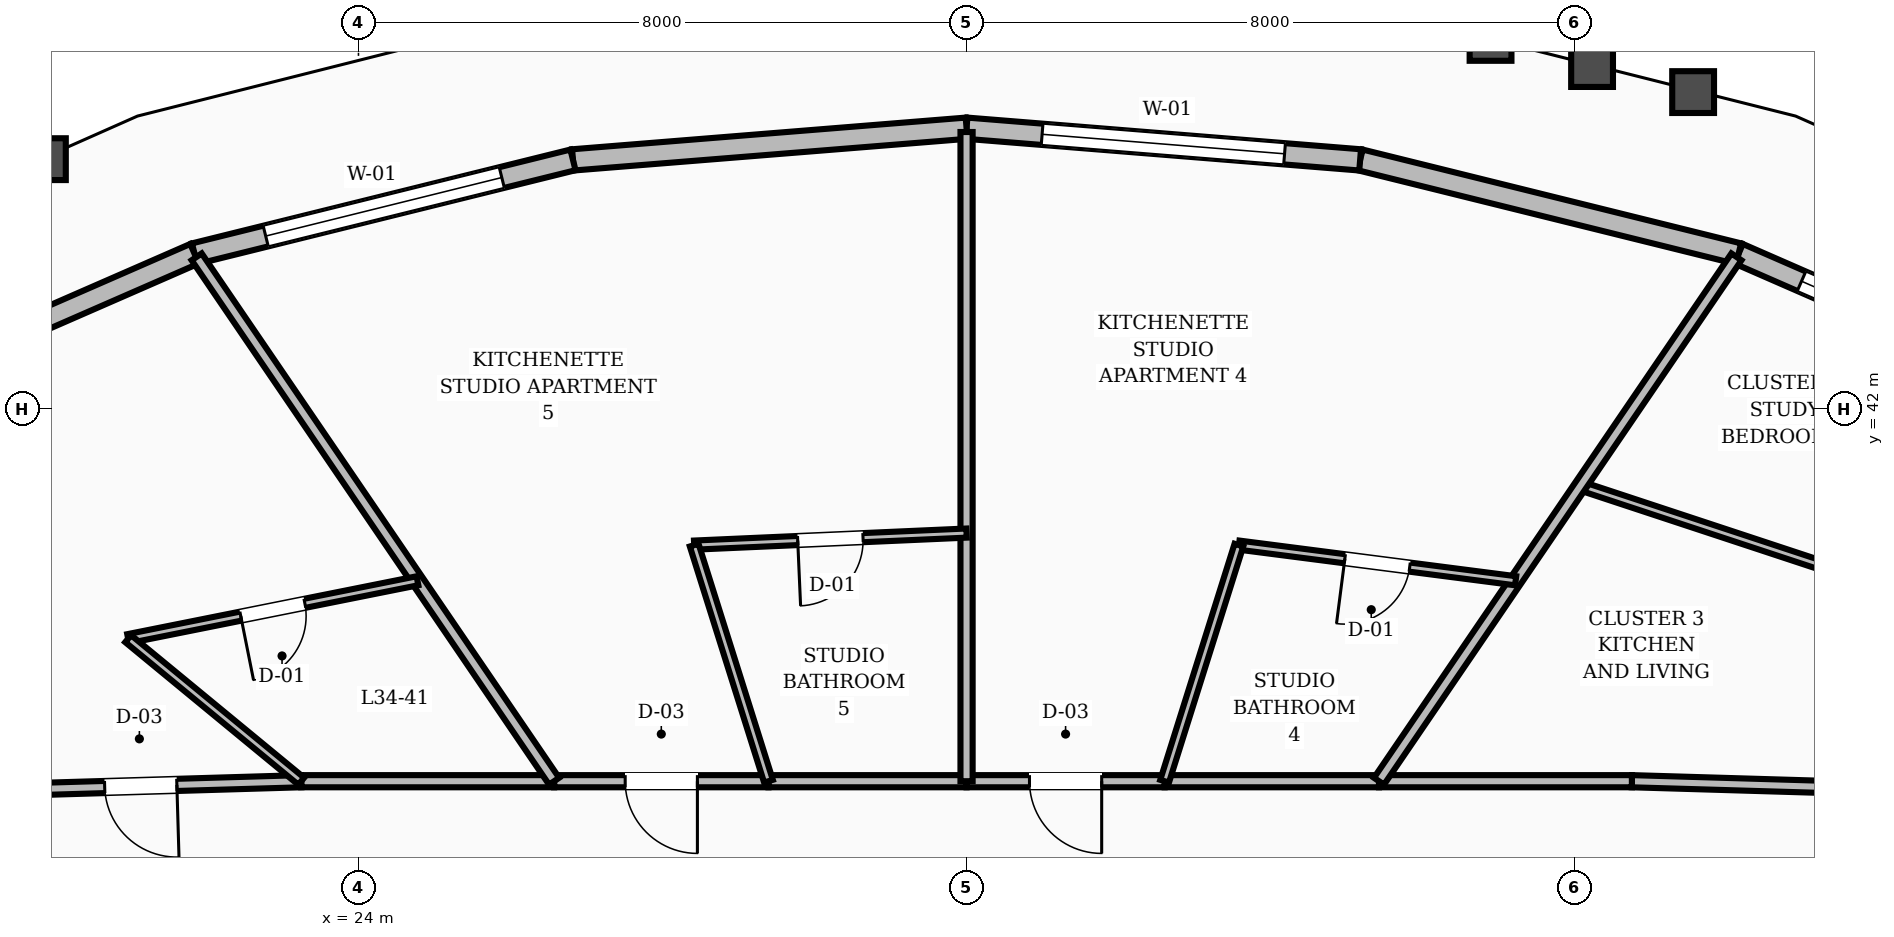
"""IFC4 building model, lengths in metres.
Left out: names, types, materials, properties, quantities, classifications, styles, units other than length and angle.
Written with IfcOpenShell. Run it as: python <this file> out.ifc"""

import sys

from ifc_helpers import new_model, si_unit, direction, frame, frame_2d, origin, place, context, subcontext, project, spatial, rectangle, extrude, element, fill, save


model = new_model("IFC4")
c1 = context("Model", 3, precision=1e-05, world=origin(), true_north=direction((0.0, 1.0)))
c2 = subcontext(c1, "Body", "Model", "MODEL_VIEW")
j1 = project(units=[si_unit("LENGTHUNIT", "METRE"), si_unit("PLANEANGLEUNIT", "RADIAN")], contexts=[c1])
p1 = place(None, origin())
s1 = spatial("IfcSite", under=j1, at=p1, CompositionType="ELEMENT")
p2 = place(p1, origin())
s2 = spatial("IfcBuilding", under=s1, at=p2, CompositionType="ELEMENT")
p3 = place(p2, frame((0.0, 0.0, 135.2)))
s3 = spatial("IfcBuildingStorey", under=s2, at=p3, CompositionType="ELEMENT", Elevation=135.2)
p4 = place(p3, frame((46.746, 42.035, 0.0), z_axis=(0.0, 0.0, 1.0), x_axis=(-0.916386582237, 0.400294431507, 0.0)))
e1 = element("IfcWall", 1, at=p4, inside=s3, PredefinedType="STANDARD", context=c2, shape_type="SweptSolid", body=[
    extrude(rectangle(XDim=5.007, YDim=0.28, at=frame_2d((2.504, 0.0))), origin(), (0.0, 0.0, 1.0), 2.82),
])
p5 = place(p4, frame((0.904, 0.0, 0.8)))
e2 = element("IfcOpeningElement", 2, at=p5, cuts=e1, PredefinedType="OPENING", context=c2, shape_type="SweptSolid", body=[
    extrude(rectangle(XDim=3.2, YDim=1.65, at=frame_2d((1.6, 0.825))), frame((0.0, 0.15, 0.0), z_axis=(0.0, -1.0, 0.0), x_axis=(1.0, 0.0, 0.0)), (0.0, 0.0, 1.0), 0.3),
])
p6 = place(p3, frame((42.157, 44.04, 0.0), z_axis=(0.0, 0.0, 1.0), x_axis=(-0.970616564694, 0.240631428415, 0.0)))
e3 = element("IfcWall", 3, at=p6, inside=s3, PredefinedType="STANDARD", context=c2, shape_type="SweptSolid", body=[
    extrude(rectangle(XDim=5.13, YDim=0.28, at=frame_2d((2.565, 0.0))), origin(), (0.0, 0.0, 1.0), 2.82),
])
p7 = place(p3, frame((37.178, 45.274, 0.0), z_axis=(0.0, 0.0, 1.0), x_axis=(-0.996776757723, 0.080225278204, 0.0)))
e4 = element("IfcWall", 4, at=p7, inside=s3, PredefinedType="STANDARD", context=c2, shape_type="SweptSolid", body=[
    extrude(rectangle(XDim=5.195, YDim=0.28, at=frame_2d((2.597, 0.0))), origin(), (0.0, 0.0, 1.0), 2.82),
])
p8 = place(p7, frame((0.997, 0.0, 0.8)))
e5 = element("IfcOpeningElement", 5, at=p8, cuts=e4, PredefinedType="OPENING", context=c2, shape_type="SweptSolid", body=[
    extrude(rectangle(XDim=3.2, YDim=1.65, at=frame_2d((1.6, 0.825))), frame((0.0, 0.15, 0.0), z_axis=(0.0, -1.0, 0.0), x_axis=(1.0, 0.0, 0.0)), (0.0, 0.0, 1.0), 0.3),
])
p9 = place(p3, frame((32.0, 45.691, 0.0), z_axis=(0.0, 0.0, 1.0), x_axis=(-0.996776757723, -0.080225278204, 0.0)))
e6 = element("IfcWall", 6, at=p9, inside=s3, PredefinedType="STANDARD", context=c2, shape_type="SweptSolid", body=[
    extrude(rectangle(XDim=5.195, YDim=0.28, at=frame_2d((2.597, 0.0))), origin(), (0.0, 0.0, 1.0), 2.82),
])
p10 = place(p3, frame((26.822, 45.274, 0.0), z_axis=(0.0, 0.0, 1.0), x_axis=(-0.970616564694, -0.240631428415, 0.0)))
e7 = element("IfcWall", 7, at=p10, inside=s3, PredefinedType="STANDARD", context=c2, shape_type="SweptSolid", body=[
    extrude(rectangle(XDim=5.13, YDim=0.28, at=frame_2d((2.565, 0.0))), origin(), (0.0, 0.0, 1.0), 2.82),
])
p11 = place(p10, frame((0.965, 0.0, 0.8)))
e8 = element("IfcOpeningElement", 8, at=p11, cuts=e7, PredefinedType="OPENING", context=c2, shape_type="SweptSolid", body=[
    extrude(rectangle(XDim=3.2, YDim=1.65, at=frame_2d((1.6, 0.825))), frame((0.0, 0.15, 0.0), z_axis=(0.0, -1.0, 0.0), x_axis=(1.0, 0.0, 0.0)), (0.0, 0.0, 1.0), 0.3),
])
p12 = place(p3, frame((21.843, 44.04, 0.0), z_axis=(0.0, 0.0, 1.0), x_axis=(-0.916386582237, -0.400294431507, 0.0)))
e9 = element("IfcWall", 9, at=p12, inside=s3, PredefinedType="STANDARD", context=c2, shape_type="SweptSolid", body=[
    extrude(rectangle(XDim=5.007, YDim=0.28, at=frame_2d((2.504, 0.0))), origin(), (0.0, 0.0, 1.0), 2.82),
])
p13 = place(p3, frame((44.975, 36.975, 0.0), z_axis=(0.0, 0.0, 1.0), x_axis=(-0.999561990195, 0.029594387265, 0.0)))
e10 = element("IfcWall", 10, at=p13, inside=s3, PredefinedType="SOLIDWALL", context=c2, shape_type="SweptSolid", body=[
    extrude(rectangle(XDim=4.224, YDim=0.16, at=frame_2d((2.112, 0.0))), origin(), (0.0, 0.0, 1.0), 2.8),
])
p14 = place(p3, frame((40.753, 37.1, 0.0), z_axis=(0.0, 0.0, 1.0), x_axis=(-1.0, 0.0, 0.0)))
e11 = element("IfcWall", 11, at=p14, inside=s3, PredefinedType="SOLIDWALL", context=c2, shape_type="SweptSolid", body=[
    extrude(rectangle(XDim=3.327, YDim=0.16, at=frame_2d((1.664, 0.0))), origin(), (0.0, 0.0, 1.0), 2.8),
])
p15 = place(p3, frame((37.426, 37.1, 0.0), z_axis=(0.0, 0.0, 1.0), x_axis=(-1.0, 0.0, 0.0)))
e12 = element("IfcWall", 12, at=p15, inside=s3, PredefinedType="SOLIDWALL", context=c2, shape_type="SweptSolid", body=[
    extrude(rectangle(XDim=2.821, YDim=0.16, at=frame_2d((1.41, 0.0))), origin(), (0.0, 0.0, 1.0), 2.8),
])
p16 = place(p3, frame((34.606, 37.1, 0.0), z_axis=(0.0, 0.0, 1.0), x_axis=(-1.0, 0.0, 0.0)))
e13 = element("IfcWall", 13, at=p16, inside=s3, PredefinedType="SOLIDWALL", context=c2, shape_type="SweptSolid", body=[
    extrude(rectangle(XDim=2.606, YDim=0.16, at=frame_2d((1.303, 0.0))), origin(), (0.0, 0.0, 1.0), 2.8),
])
p17 = place(p16, frame((0.828, 0.0, 0.0)))
e14 = element("IfcOpeningElement", 14, at=p17, cuts=e13, PredefinedType="OPENING", context=c2, shape_type="SweptSolid", body=[
    extrude(rectangle(XDim=0.95, YDim=2.1, at=frame_2d((0.475, 1.05))), frame((0.0, 0.09, 0.0), z_axis=(0.0, -1.0, 0.0), x_axis=(1.0, 0.0, 0.0)), (0.0, 0.0, 1.0), 0.18),
])
p18 = place(p3, frame((32.0, 37.1, 0.0), z_axis=(0.0, 0.0, 1.0), x_axis=(-1.0, 0.0, 0.0)))
e15 = element("IfcWall", 15, at=p18, inside=s3, PredefinedType="SOLIDWALL", context=c2, shape_type="SweptSolid", body=[
    extrude(rectangle(XDim=2.606, YDim=0.16, at=frame_2d((1.303, 0.0))), origin(), (0.0, 0.0, 1.0), 2.8),
])
p19 = place(p3, frame((29.394, 37.1, 0.0), z_axis=(0.0, 0.0, 1.0), x_axis=(-1.0, 0.0, 0.0)))
e16 = element("IfcWall", 16, at=p19, inside=s3, PredefinedType="SOLIDWALL", context=c2, shape_type="SweptSolid", body=[
    extrude(rectangle(XDim=2.821, YDim=0.16, at=frame_2d((1.41, 0.0))), origin(), (0.0, 0.0, 1.0), 2.8),
])
p20 = place(p19, frame((0.935, 0.0, 0.0)))
e17 = element("IfcOpeningElement", 17, at=p20, cuts=e16, PredefinedType="OPENING", context=c2, shape_type="SweptSolid", body=[
    extrude(rectangle(XDim=0.95, YDim=2.1, at=frame_2d((0.475, 1.05))), frame((0.0, 0.09, 0.0), z_axis=(0.0, -1.0, 0.0), x_axis=(1.0, 0.0, 0.0)), (0.0, 0.0, 1.0), 0.18),
])
p21 = place(p3, frame((26.574, 37.1, 0.0), z_axis=(0.0, 0.0, 1.0), x_axis=(-1.0, 0.0, 0.0)))
e18 = element("IfcWall", 18, at=p21, inside=s3, PredefinedType="SOLIDWALL", context=c2, shape_type="SweptSolid", body=[
    extrude(rectangle(XDim=3.327, YDim=0.16, at=frame_2d((1.664, 0.0))), origin(), (0.0, 0.0, 1.0), 2.8),
])
p22 = place(p3, frame((23.247, 37.1, 0.0), z_axis=(0.0, 0.0, 1.0), x_axis=(-0.999561990195, -0.029594387265, 0.0)))
e19 = element("IfcWall", 19, at=p22, inside=s3, PredefinedType="SOLIDWALL", context=c2, shape_type="SweptSolid", body=[
    extrude(rectangle(XDim=4.224, YDim=0.16, at=frame_2d((2.112, 0.0))), origin(), (0.0, 0.0, 1.0), 2.8),
])
p23 = place(p22, frame((1.637, 0.0, 0.0)))
e20 = element("IfcOpeningElement", 20, at=p23, cuts=e19, PredefinedType="OPENING", context=c2, shape_type="SweptSolid", body=[
    extrude(rectangle(XDim=0.95, YDim=2.1, at=frame_2d((0.475, 1.05))), frame((0.0, 0.09, 0.0), z_axis=(0.0, -1.0, 0.0), x_axis=(1.0, 0.0, 0.0)), (0.0, 0.0, 1.0), 0.18),
])
p24 = place(p3, frame((48.219, 38.298, 0.0), z_axis=(0.0, 0.0, 1.0), x_axis=(-0.949596025741, 0.313476295591, 0.0)))
e21 = element("IfcWall", 21, at=p24, inside=s3, PredefinedType="PARTITIONING", context=c2, shape_type="SweptSolid", body=[
    extrude(rectangle(XDim=8.575, YDim=0.12, at=frame_2d((4.288, 0.0))), origin(), (0.0, 0.0, 1.0), 2.8),
])
p25 = place(p24, frame((3.813, 0.0, 0.0)))
e22 = element("IfcOpeningElement", 22, at=p25, cuts=e21, PredefinedType="OPENING", context=c2, shape_type="SweptSolid", body=[
    extrude(rectangle(XDim=0.95, YDim=2.1, at=frame_2d((0.475, 1.05))), frame((0.0, 0.07, 0.0), z_axis=(0.0, -1.0, 0.0), x_axis=(1.0, 0.0, 0.0)), (0.0, 0.0, 1.0), 0.14),
])
p26 = place(p3, frame((37.426, 37.1, 0.0), z_axis=(0.0, 0.0, 1.0), x_axis=(0.563247896503, 0.826287968619, 0.0)))
e23 = element("IfcWall", 23, at=p26, inside=s3, PredefinedType="SOLIDWALL", context=c2, shape_type="SweptSolid", body=[
    extrude(rectangle(XDim=8.349, YDim=0.16, at=frame_2d((4.174, 0.0))), origin(), (0.0, 0.0, 1.0), 2.8),
])
p27 = place(p3, frame((39.224, 39.737, 0.0), z_axis=(0.0, 0.0, 1.0), x_axis=(-0.991795828826, 0.127832053581, 0.0)))
e24 = element("IfcWall", 24, at=p27, inside=s3, PredefinedType="PARTITIONING", context=c2, shape_type="SweptSolid", body=[
    extrude(rectangle(XDim=3.671, YDim=0.12, at=frame_2d((1.835, 0.0))), origin(), (0.0, 0.0, 1.0), 2.8),
])
p28 = place(p27, frame((1.406, 0.0, 0.0)))
e25 = element("IfcOpeningElement", 25, at=p28, cuts=e24, PredefinedType="OPENING", context=c2, shape_type="SweptSolid", body=[
    extrude(rectangle(XDim=0.86, YDim=2.1, at=frame_2d((0.43, 1.05))), frame((0.0, 0.07, 0.0), z_axis=(0.0, -1.0, 0.0), x_axis=(1.0, 0.0, 0.0)), (0.0, 0.0, 1.0), 0.14),
])
p29 = place(p3, frame((34.606, 37.1, 0.0), z_axis=(0.0, 0.0, 1.0), x_axis=(0.300191134318, 0.953879071411, 0.0)))
e26 = element("IfcWall", 26, at=p29, inside=s3, PredefinedType="PARTITIONING", context=c2, shape_type="SweptSolid", body=[
    extrude(rectangle(XDim=3.256, YDim=0.12, at=frame_2d((1.628, 0.0))), origin(), (0.0, 0.0, 1.0), 2.8),
])
p30 = place(p3, frame((32.0, 37.1, 0.0), z_axis=(0.0, 0.0, 1.0), x_axis=(0.0, 1.0, 0.0)))
e27 = element("IfcWall", 27, at=p30, inside=s3, PredefinedType="SOLIDWALL", context=c2, shape_type="SweptSolid", body=[
    extrude(rectangle(XDim=8.541, YDim=0.16, at=frame_2d((4.271, 0.0))), origin(), (0.0, 0.0, 1.0), 2.8),
])
p31 = place(p3, frame((32.0, 40.365, 0.0), z_axis=(0.0, 0.0, 1.0), x_axis=(-0.999026779897, -0.044107743638, 0.0)))
e28 = element("IfcWall", 28, at=p31, inside=s3, PredefinedType="PARTITIONING", context=c2, shape_type="SweptSolid", body=[
    extrude(rectangle(XDim=3.587, YDim=0.12, at=frame_2d((1.793, 0.0))), origin(), (0.0, 0.0, 1.0), 2.8),
])
p32 = place(p31, frame((1.363, 0.0, 0.0)))
e29 = element("IfcOpeningElement", 29, at=p32, cuts=e28, PredefinedType="OPENING", context=c2, shape_type="SweptSolid", body=[
    extrude(rectangle(XDim=0.86, YDim=2.1, at=frame_2d((0.43, 1.05))), frame((0.0, 0.07, 0.0), z_axis=(0.0, -1.0, 0.0), x_axis=(1.0, 0.0, 0.0)), (0.0, 0.0, 1.0), 0.14),
])
p33 = place(p3, frame((29.394, 37.1, 0.0), z_axis=(0.0, 0.0, 1.0), x_axis=(-0.300191134318, 0.953879071411, 0.0)))
e30 = element("IfcWall", 30, at=p33, inside=s3, PredefinedType="PARTITIONING", context=c2, shape_type="SweptSolid", body=[
    extrude(rectangle(XDim=3.256, YDim=0.12, at=frame_2d((1.628, 0.0))), origin(), (0.0, 0.0, 1.0), 2.8),
])
p34 = place(p3, frame((26.574, 37.1, 0.0), z_axis=(0.0, 0.0, 1.0), x_axis=(-0.563247896503, 0.826287968619, 0.0)))
e31 = element("IfcWall", 31, at=p34, inside=s3, PredefinedType="SOLIDWALL", context=c2, shape_type="SweptSolid", body=[
    extrude(rectangle(XDim=8.349, YDim=0.16, at=frame_2d((4.174, 0.0))), origin(), (0.0, 0.0, 1.0), 2.8),
])
p35 = place(p3, frame((24.776, 39.737, 0.0), z_axis=(0.0, 0.0, 1.0), x_axis=(-0.980558899125, -0.196224986548, 0.0)))
e32 = element("IfcWall", 32, at=p35, inside=s3, PredefinedType="PARTITIONING", context=c2, shape_type="SweptSolid", body=[
    extrude(rectangle(XDim=3.882, YDim=0.12, at=frame_2d((1.941, 0.0))), origin(), (0.0, 0.0, 1.0), 2.8),
])
p36 = place(p35, frame((1.511, 0.0, 0.0)))
e33 = element("IfcOpeningElement", 33, at=p36, cuts=e32, PredefinedType="OPENING", context=c2, shape_type="SweptSolid", body=[
    extrude(rectangle(XDim=0.86, YDim=2.1, at=frame_2d((0.43, 1.05))), frame((0.0, 0.07, 0.0), z_axis=(0.0, -1.0, 0.0), x_axis=(1.0, 0.0, 0.0)), (0.0, 0.0, 1.0), 0.14),
])
p37 = place(p3, frame((23.247, 37.1, 0.0), z_axis=(0.0, 0.0, 1.0), x_axis=(-0.771932624653, 0.635704351877, 0.0)))
e34 = element("IfcWall", 34, at=p37, inside=s3, PredefinedType="PARTITIONING", context=c2, shape_type="SweptSolid", body=[
    extrude(rectangle(XDim=2.95, YDim=0.12, at=frame_2d((1.475, 0.0))), origin(), (0.0, 0.0, 1.0), 2.8),
])
p38 = place(p5, origin())
e35 = element("IfcWindow", 35, at=p38, inside=s3, PartitioningType="SINGLE_PANEL", PredefinedType="WINDOW", context=c2, shape_type="SweptSolid", body=[
    extrude(rectangle(XDim=3.2, YDim=1.65, at=frame_2d((1.6, 0.825))), frame((0.0, 0.03, 0.0), z_axis=(0.0, -1.0, 0.0), x_axis=(1.0, 0.0, 0.0)), (0.0, 0.0, 1.0), 0.06),
])
fill(e2, e35)
p39 = place(p8, origin())
e36 = element("IfcWindow", 36, at=p39, inside=s3, PartitioningType="SINGLE_PANEL", PredefinedType="WINDOW", context=c2, shape_type="SweptSolid", body=[
    extrude(rectangle(XDim=3.2, YDim=1.65, at=frame_2d((1.6, 0.825))), frame((0.0, 0.03, 0.0), z_axis=(0.0, -1.0, 0.0), x_axis=(1.0, 0.0, 0.0)), (0.0, 0.0, 1.0), 0.06),
])
fill(e5, e36)
p40 = place(p11, origin())
e37 = element("IfcWindow", 37, at=p40, inside=s3, PartitioningType="SINGLE_PANEL", PredefinedType="WINDOW", context=c2, shape_type="SweptSolid", body=[
    extrude(rectangle(XDim=3.2, YDim=1.65, at=frame_2d((1.6, 0.825))), frame((0.0, 0.03, 0.0), z_axis=(0.0, -1.0, 0.0), x_axis=(1.0, 0.0, 0.0)), (0.0, 0.0, 1.0), 0.06),
])
fill(e8, e37)
p41 = place(p28, origin())
e38 = element("IfcDoor", 38, at=p41, inside=s3, OperationType="SINGLE_SWING_RIGHT", PredefinedType="DOOR", context=c2, shape_type="SweptSolid", body=[
    extrude(rectangle(XDim=0.86, YDim=2.1, at=frame_2d((0.43, 1.05))), frame((0.0, 0.025, 0.0), z_axis=(0.0, -1.0, 0.0), x_axis=(1.0, 0.0, 0.0)), (0.0, 0.0, 1.0), 0.05),
])
fill(e25, e38)
p42 = place(p17, origin())
e39 = element("IfcDoor", 39, at=p42, inside=s3, OperationType="SINGLE_SWING_LEFT", PredefinedType="DOOR", context=c2, shape_type="SweptSolid", body=[
    extrude(rectangle(XDim=0.95, YDim=2.1, at=frame_2d((0.475, 1.05))), frame((0.0, 0.025, 0.0), z_axis=(0.0, -1.0, 0.0), x_axis=(1.0, 0.0, 0.0)), (0.0, 0.0, 1.0), 0.05),
])
fill(e14, e39)
p43 = place(p32, origin())
e40 = element("IfcDoor", 40, at=p43, inside=s3, OperationType="SINGLE_SWING_RIGHT", PredefinedType="DOOR", context=c2, shape_type="SweptSolid", body=[
    extrude(rectangle(XDim=0.86, YDim=2.1, at=frame_2d((0.43, 1.05))), frame((0.0, 0.025, 0.0), z_axis=(0.0, -1.0, 0.0), x_axis=(1.0, 0.0, 0.0)), (0.0, 0.0, 1.0), 0.05),
])
fill(e29, e40)
p44 = place(p20, origin())
e41 = element("IfcDoor", 41, at=p44, inside=s3, OperationType="SINGLE_SWING_LEFT", PredefinedType="DOOR", context=c2, shape_type="SweptSolid", body=[
    extrude(rectangle(XDim=0.95, YDim=2.1, at=frame_2d((0.475, 1.05))), frame((0.0, 0.025, 0.0), z_axis=(0.0, -1.0, 0.0), x_axis=(1.0, 0.0, 0.0)), (0.0, 0.0, 1.0), 0.05),
])
fill(e17, e41)
p45 = place(p36, origin())
e42 = element("IfcDoor", 42, at=p45, inside=s3, OperationType="SINGLE_SWING_RIGHT", PredefinedType="DOOR", context=c2, shape_type="SweptSolid", body=[
    extrude(rectangle(XDim=0.86, YDim=2.1, at=frame_2d((0.43, 1.05))), frame((0.0, 0.025, 0.0), z_axis=(0.0, -1.0, 0.0), x_axis=(1.0, 0.0, 0.0)), (0.0, 0.0, 1.0), 0.05),
])
fill(e33, e42)
p46 = place(p23, origin())
e43 = element("IfcDoor", 43, at=p46, inside=s3, OperationType="SINGLE_SWING_LEFT", PredefinedType="DOOR", context=c2, shape_type="SweptSolid", body=[
    extrude(rectangle(XDim=0.95, YDim=2.1, at=frame_2d((0.475, 1.05))), frame((0.0, 0.025, 0.0), z_axis=(0.0, -1.0, 0.0), x_axis=(1.0, 0.0, 0.0)), (0.0, 0.0, 1.0), 0.05),
])
fill(e20, e43)
save(model, sys.argv[1])
